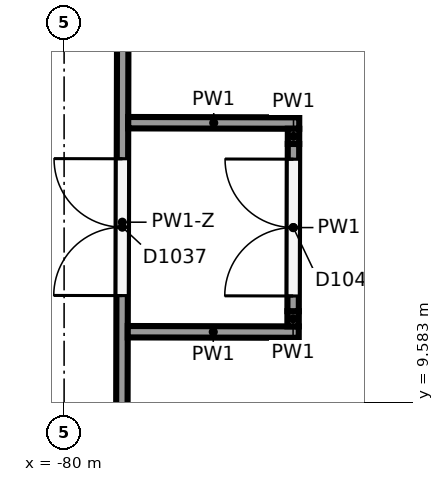
"""IFC4 building model, lengths in metres.
Left out: names, types, materials, properties, quantities, classifications, styles, units other than length and angle.
Written with IfcOpenShell. Run it as: python <this file> out.ifc"""

import sys

from ifc_helpers import new_model, si_unit, direction, frame, frame_2d, origin, place, context, subcontext, project, spatial, rectangle, extrude, element, fill, save


model = new_model("IFC4")
c1 = context("Model", 3, precision=1e-05, world=origin(), true_north=direction((0.0, 1.0)))
c2 = subcontext(c1, "Body", "Model", "MODEL_VIEW")
j1 = project(units=[si_unit("LENGTHUNIT", "METRE"), si_unit("PLANEANGLEUNIT", "RADIAN")], contexts=[c1])
p1 = place(None, origin())
s1 = spatial("IfcSite", under=j1, at=p1, CompositionType="ELEMENT")
p2 = place(p1, origin())
s2 = spatial("IfcBuilding", under=s1, at=p2, CompositionType="ELEMENT")
p3 = place(p2, frame((0.0, 0.0, 12.0)))
s3 = spatial("IfcBuildingStorey", under=s2, at=p3, CompositionType="ELEMENT", Elevation=12.0)
p4 = place(p3, frame((-79.247, 6.537, 0.0), z_axis=(0.0, 0.0, 1.0), x_axis=(0.002276512155, 0.999997408743, 0.0)))
e1 = element("IfcWall", 1, at=p4, inside=s3, PredefinedType="PARTITIONING", context=c2, shape_type="SweptSolid", body=[
    extrude(rectangle(XDim=10.832, YDim=0.15, at=frame_2d((5.416, 0.0))), origin(), (0.0, 0.0, 1.0), 4.124),
])
p5 = place(p4, frame((4.45, 0.0, 0.0)))
e2 = element("IfcOpeningElement", 2, at=p5, cuts=e1, PredefinedType="OPENING", context=c2, shape_type="SweptSolid", body=[
    extrude(rectangle(XDim=1.8, YDim=2.1, at=frame_2d((0.9, 1.05))), frame((0.0, 0.085, 0.0), z_axis=(0.0, -1.0, 0.0), x_axis=(1.0, 0.0, 0.0)), (0.0, 0.0, 1.0), 0.17),
])
for number, where, z_axis, x_axis in (
    (3, (-79.163, 10.511, 0.0), (0.0, 0.0, 1.0), (1.0, -0.002, 0.0)),
    (4, (-79.156, 13.261, 0.0), (0.0, 0.0, 1.0), (1.0, -0.002, 0.0)),
):
    element("IfcWall", number, at=place(p3, frame(where, z_axis=z_axis, x_axis=x_axis)), inside=s3, PredefinedType="PARTITIONING", context=c2, shape_type="SweptSolid", body=[
        extrude(rectangle(XDim=2.25, YDim=0.15, at=frame_2d((1.125, 0.0))), origin(), (0.0, 0.0, 1.0), 5.65),
    ])
p6 = place(p3, frame((-76.988, 10.582, 0.0), z_axis=(0.0, 0.0, 1.0), x_axis=(0.002441995161, 0.999997018325, 0.0)))
e5 = element("IfcWall", 5, at=p6, inside=s3, PredefinedType="PARTITIONING", context=c2, shape_type="SweptSolid", body=[
    extrude(rectangle(XDim=0.2, YDim=0.15, at=frame_2d((0.1, 0.0))), origin(), (0.0, 0.0, 1.0), 5.65),
])
p7 = place(p3, frame((-76.987, 10.781, 0.0), z_axis=(0.0, 0.0, 1.0), x_axis=(0.002330220038, 0.999997285034, 0.0)))
e6 = element("IfcWall", 6, at=p7, inside=s3, PredefinedType="PARTITIONING", context=c2, shape_type="SweptSolid", body=[
    extrude(rectangle(XDim=2.2, YDim=0.15, at=frame_2d((1.1, 0.0))), origin(), (0.0, 0.0, 1.0), 5.65),
])
p8 = place(p7, frame((0.2, 0.0, 0.0)))
e7 = element("IfcOpeningElement", 7, at=p8, cuts=e6, PredefinedType="OPENING", context=c2, shape_type="SweptSolid", body=[
    extrude(rectangle(XDim=1.8, YDim=2.1, at=frame_2d((0.9, 1.05))), frame((0.0, 0.085, 0.0), z_axis=(0.0, -1.0, 0.0), x_axis=(1.0, 0.0, 0.0)), (0.0, 0.0, 1.0), 0.17),
])
p9 = place(p3, frame((-76.982, 12.982, 0.0), z_axis=(0.0, 0.0, 1.0), x_axis=(0.002441995161, 0.999997018325, 0.0)))
e8 = element("IfcWall", 8, at=p9, inside=s3, PredefinedType="PARTITIONING", context=c2, shape_type="SweptSolid", body=[
    extrude(rectangle(XDim=0.2, YDim=0.15, at=frame_2d((0.1, 0.0))), origin(), (0.0, 0.0, 1.0), 5.65),
])
p10 = place(p5, origin())
e9 = element("IfcDoor", 9, at=p10, inside=s3, OperationType="DOUBLE_DOOR_SINGLE_SWING", PredefinedType="DOOR", context=c2, shape_type="SweptSolid", body=[
    extrude(rectangle(XDim=1.8, YDim=2.1, at=frame_2d((0.9, 1.05))), frame((0.0, 0.025, 0.0), z_axis=(0.0, -1.0, 0.0), x_axis=(1.0, 0.0, 0.0)), (0.0, 0.0, 1.0), 0.05),
])
fill(e2, e9)
p11 = place(p8, origin())
e10 = element("IfcDoor", 10, at=p11, inside=s3, OperationType="DOUBLE_DOOR_SINGLE_SWING", PredefinedType="DOOR", context=c2, shape_type="SweptSolid", body=[
    extrude(rectangle(XDim=1.8, YDim=2.1, at=frame_2d((0.9, 1.05))), frame((0.0, 0.025, 0.0), z_axis=(0.0, -1.0, 0.0), x_axis=(1.0, 0.0, 0.0)), (0.0, 0.0, 1.0), 0.05),
])
fill(e7, e10)
save(model, sys.argv[1])
